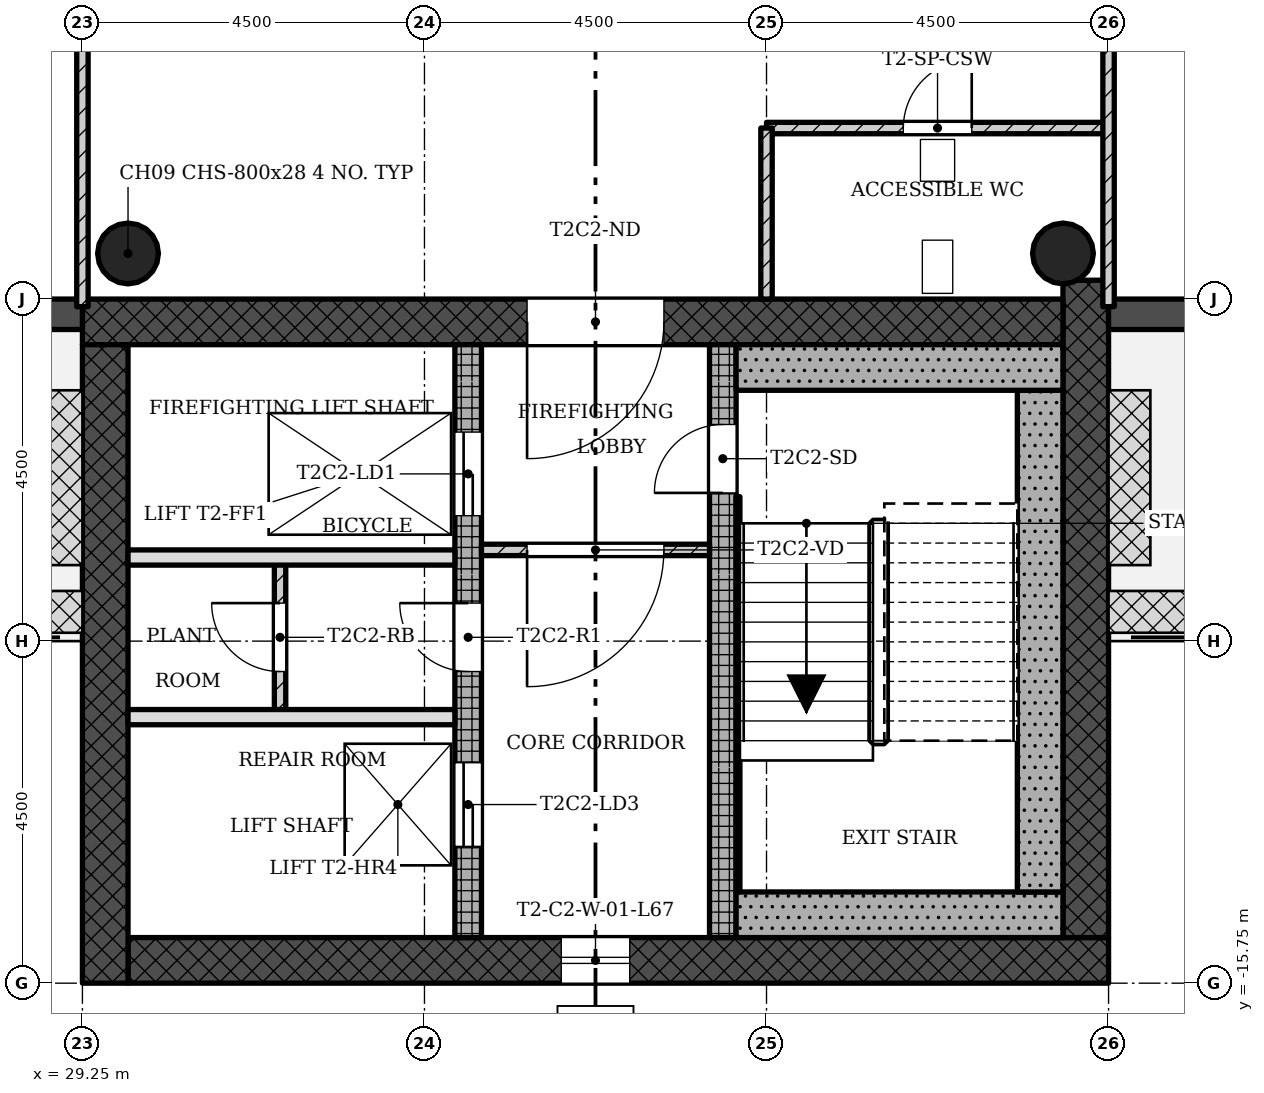
"""IFC4 building model, lengths in metres.
Left out: names, types, materials, properties, quantities, classifications, styles, units other than length and angle.
Written with IfcOpenShell. Run it as: python <this file> out.ifc"""

import sys

from ifc_helpers import new_model, si_unit, direction, frame, frame_2d, origin, origin_2d, place, context, subcontext, project, spatial, rectangle, hollow_circle, extrude, element, fill, save


model = new_model("IFC4")
c1 = context("Model", 3, precision=1e-05, world=origin(), true_north=direction((0.0, 1.0)))
c2 = subcontext(c1, "Body", "Model", "MODEL_VIEW")
j1 = project(units=[si_unit("LENGTHUNIT", "METRE"), si_unit("PLANEANGLEUNIT", "RADIAN")], contexts=[c1])
p1 = place(None, origin())
s1 = spatial("IfcSite", under=j1, at=p1, CompositionType="ELEMENT")
p2 = place(p1, origin())
s2 = spatial("IfcBuilding", under=s1, at=p2, CompositionType="ELEMENT")
p3 = place(p2, frame((0.0, 0.0, 242.4)))
s3 = spatial("IfcBuildingStorey", under=s2, at=p3, CompositionType="ELEMENT", Elevation=242.4)
p4 = place(p3, frame((29.85, -15.45, 0.0), z_axis=(0.0, 0.0, 1.0), x_axis=(1.0, 0.0, 0.0)))
e1 = element("IfcWall", 1, at=p4, inside=s3, PredefinedType="SHEAR", context=c2, shape_type="SweptSolid", body=[
    extrude(rectangle(XDim=12.9, YDim=0.6, at=frame_2d((6.45, 0.0))), origin(), (0.0, 0.0, 1.0), 4.5),
])
p5 = place(p4, frame((5.7, 0.0, 0.45)))
e2 = element("IfcOpeningElement", 2, at=p5, cuts=e1, PredefinedType="OPENING", context=c2, shape_type="SweptSolid", body=[
    extrude(rectangle(XDim=0.9, YDim=2.4, at=frame_2d((0.45, 1.2))), frame((0.0, 0.31, 0.0), z_axis=(0.0, -1.0, 0.0), x_axis=(1.0, 0.0, 0.0)), (0.0, 0.0, 1.0), 0.62),
])
p6 = place(p3, frame((42.45, -15.15, 0.0), z_axis=(0.0, 0.0, 1.0), x_axis=(0.0, 1.0, 0.0)))
e3 = element("IfcWall", 3, at=p6, inside=s3, PredefinedType="SHEAR", context=c2, shape_type="SweptSolid", body=[
    extrude(rectangle(XDim=8.648, YDim=0.6, at=frame_2d((4.324, 0.0))), origin(), (0.0, 0.0, 1.0), 4.5),
])
p7 = place(p3, frame((42.15, -7.05, 0.0), z_axis=(0.0, 0.0, 1.0), x_axis=(-1.0, 0.0, 0.0)))
e4 = element("IfcWall", 4, at=p7, inside=s3, PredefinedType="SHEAR", context=c2, shape_type="SweptSolid", body=[
    extrude(rectangle(XDim=12.9, YDim=0.6, at=frame_2d((6.45, 0.0))), origin(), (0.0, 0.0, 1.0), 4.5),
])
p8 = place(p7, frame((5.25, 0.0, 0.0)))
e5 = element("IfcOpeningElement", 5, at=p8, cuts=e4, PredefinedType="OPENING", context=c2, shape_type="SweptSolid", body=[
    extrude(rectangle(XDim=1.8, YDim=2.1, at=frame_2d((0.9, 1.05))), frame((0.0, 0.31, 0.0), z_axis=(0.0, -1.0, 0.0), x_axis=(1.0, 0.0, 0.0)), (0.0, 0.0, 1.0), 0.62),
])
p9 = place(p3, frame((29.55, -7.35, 0.0), z_axis=(0.0, 0.0, 1.0), x_axis=(0.0, -1.0, 0.0)))
e6 = element("IfcWall", 6, at=p9, inside=s3, PredefinedType="SHEAR", context=c2, shape_type="SweptSolid", body=[
    extrude(rectangle(XDim=8.4, YDim=0.6, at=frame_2d((4.2, 0.0))), origin(), (0.0, 0.0, 1.0), 4.5),
])
p10 = place(p3, frame((34.325, -15.15, 0.0), z_axis=(0.0, 0.0, 1.0), x_axis=(0.0, 1.0, 0.0)))
e7 = element("IfcWall", 7, at=p10, inside=s3, PredefinedType="SHEAR", context=c2, shape_type="SweptSolid", body=[
    extrude(rectangle(XDim=7.8, YDim=0.35, at=frame_2d((3.9, 0.0))), origin(), (0.0, 0.0, 1.0), 4.5),
])
p11 = place(p10, frame((5.55, 0.0, 0.0)))
e8 = element("IfcOpeningElement", 8, at=p11, cuts=e7, PredefinedType="OPENING", context=c2, shape_type="SweptSolid", body=[
    extrude(rectangle(XDim=1.1, YDim=2.1, at=frame_2d((0.55, 1.05))), frame((0.0, 0.185, 0.0), z_axis=(0.0, -1.0, 0.0), x_axis=(1.0, 0.0, 0.0)), (0.0, 0.0, 1.0), 0.37),
])
p12 = place(p10, frame((1.2, 0.0, 0.0)))
e9 = element("IfcOpeningElement", 9, at=p12, cuts=e7, PredefinedType="OPENING", context=c2, shape_type="SweptSolid", body=[
    extrude(rectangle(XDim=1.1, YDim=2.1, at=frame_2d((0.55, 1.05))), frame((0.0, 0.185, 0.0), z_axis=(0.0, -1.0, 0.0), x_axis=(1.0, 0.0, 0.0)), (0.0, 0.0, 1.0), 0.37),
])
p13 = place(p10, frame((3.5, 0.0, 0.0)))
e10 = element("IfcOpeningElement", 10, at=p13, cuts=e7, PredefinedType="OPENING", context=c2, shape_type="SweptSolid", body=[
    extrude(rectangle(XDim=0.9, YDim=2.1, at=frame_2d((0.45, 1.05))), frame((0.0, 0.185, 0.0), z_axis=(0.0, -1.0, 0.0), x_axis=(1.0, 0.0, 0.0)), (0.0, 0.0, 1.0), 0.37),
])
p14 = place(p3, frame((37.675, -15.15, 0.0), z_axis=(0.0, 0.0, 1.0), x_axis=(0.0, 1.0, 0.0)))
e11 = element("IfcWall", 11, at=p14, inside=s3, PredefinedType="SHEAR", context=c2, shape_type="SweptSolid", body=[
    extrude(rectangle(XDim=7.8, YDim=0.35, at=frame_2d((3.9, 0.0))), origin(), (0.0, 0.0, 1.0), 4.5),
])
p15 = place(p14, frame((5.85, 0.0, 0.0)))
e12 = element("IfcOpeningElement", 12, at=p15, cuts=e11, PredefinedType="OPENING", context=c2, shape_type="SweptSolid", body=[
    extrude(rectangle(XDim=0.9, YDim=2.1, at=frame_2d((0.45, 1.05))), frame((0.0, 0.185, 0.0), z_axis=(0.0, -1.0, 0.0), x_axis=(1.0, 0.0, 0.0)), (0.0, 0.0, 1.0), 0.37),
])
for number, where, z_axis, x_axis in (
    (13, (42.15, -6.15, 0.0), (0.0, 0.0, 1.0), (1.0, 0.0, 0.0)),
    (14, (29.85, -6.15, 0.0), (0.0, 0.0, 1.0), (1.0, 0.0, 0.0)),
):
    element("IfcColumn", number, at=place(p3, frame(where, z_axis=z_axis, x_axis=x_axis)), inside=s3, PredefinedType="COLUMN", context=c2, shape_type="SweptSolid", body=[
        extrude(hollow_circle(Radius=0.4, WallThickness=0.028, at=origin_2d()), origin(), (0.0, 0.0, 1.0), 4.5),
    ])
p16 = place(p3, frame((42.75, -6.95, -0.02), z_axis=(0.0, 0.0, 1.0), x_axis=(1.0, 0.0, 0.0)))
e15 = element("IfcWall", 15, at=p16, inside=s3, PredefinedType="STANDARD", context=c2, shape_type="SweptSolid", body=[
    extrude(rectangle(XDim=4.5, YDim=0.4, at=frame_2d((2.25, 0.0))), origin(), (0.0, 0.0, 1.0), 4.22),
])
p17 = place(p16, frame((1.35, 0.0, 0.02)))
e16 = element("IfcOpeningElement", 16, at=p17, cuts=e15, PredefinedType="OPENING", context=c2, shape_type="SweptSolid", body=[
    extrude(rectangle(XDim=1.8, YDim=2.1, at=frame_2d((0.9, 1.05))), frame((0.0, 0.21, 0.0), z_axis=(0.0, -1.0, 0.0), x_axis=(1.0, 0.0, 0.0)), (0.0, 0.0, 1.0), 0.42),
])
p18 = place(p3, frame((24.75, -6.95, -0.02), z_axis=(0.0, 0.0, 1.0), x_axis=(1.0, 0.0, 0.0)))
e17 = element("IfcWall", 17, at=p18, inside=s3, PredefinedType="STANDARD", context=c2, shape_type="SweptSolid", body=[
    extrude(rectangle(XDim=4.5, YDim=0.4, at=frame_2d((2.25, 0.0))), origin(), (0.0, 0.0, 1.0), 4.22),
])
p19 = place(p18, frame((1.35, 0.0, 0.02)))
e18 = element("IfcOpeningElement", 18, at=p19, cuts=e17, PredefinedType="OPENING", context=c2, shape_type="SweptSolid", body=[
    extrude(rectangle(XDim=1.8, YDim=2.1, at=frame_2d((0.9, 1.05))), frame((0.0, 0.21, 0.0), z_axis=(0.0, -1.0, 0.0), x_axis=(1.0, 0.0, 0.0)), (0.0, 0.0, 1.0), 0.42),
])
p20 = place(p3, frame((34.5, -10.05, 0.0), z_axis=(0.0, 0.0, 1.0), x_axis=(1.0, 0.0, 0.0)))
e19 = element("IfcWall", 19, at=p20, inside=s3, PredefinedType="PARTITIONING", context=c2, shape_type="SweptSolid", body=[
    extrude(rectangle(XDim=3.0, YDim=0.15, at=frame_2d((1.5, 0.0))), origin(), (0.0, 0.0, 1.0), 4.08),
])
p21 = place(p20, frame((0.6, 0.0, 0.0)))
e20 = element("IfcOpeningElement", 20, at=p21, cuts=e19, PredefinedType="OPENING", context=c2, shape_type="SweptSolid", body=[
    extrude(rectangle(XDim=1.8, YDim=2.1, at=frame_2d((0.9, 1.05))), frame((0.0, 0.085, 0.0), z_axis=(0.0, -1.0, 0.0), x_axis=(1.0, 0.0, 0.0)), (0.0, 0.0, 1.0), 0.17),
])
for number, where, z_axis, x_axis in (
    (21, (29.85, -12.25, 0.0), (0.0, 0.0, 1.0), (1.0, 0.0, 0.0)),
    (22, (29.85, -10.15, 0.0), (0.0, 0.0, 1.0), (1.0, 0.0, 0.0)),
):
    element("IfcWall", number, at=place(p3, frame(where, z_axis=z_axis, x_axis=x_axis)), inside=s3, PredefinedType="SOLIDWALL", context=c2, shape_type="SweptSolid", body=[
        extrude(rectangle(XDim=4.3, YDim=0.2, at=frame_2d((2.15, 0.0))), origin(), (0.0, 0.0, 1.0), 4.08),
    ])
p22 = place(p3, frame((31.85, -10.15, 0.0), z_axis=(0.0, 0.0, 1.0), x_axis=(0.0, -1.0, 0.0)))
e23 = element("IfcWall", 23, at=p22, inside=s3, PredefinedType="PARTITIONING", context=c2, shape_type="SweptSolid", body=[
    extrude(rectangle(XDim=2.1, YDim=0.15, at=frame_2d((1.05, 0.0))), origin(), (0.0, 0.0, 1.0), 4.08),
])
p23 = place(p22, frame((0.6, 0.0, 0.0)))
e24 = element("IfcOpeningElement", 24, at=p23, cuts=e23, PredefinedType="OPENING", context=c2, shape_type="SweptSolid", body=[
    extrude(rectangle(XDim=0.9, YDim=2.1, at=frame_2d((0.45, 1.05))), frame((0.0, 0.085, 0.0), z_axis=(0.0, -1.0, 0.0), x_axis=(1.0, 0.0, 0.0)), (0.0, 0.0, 1.0), 0.17),
])
p24 = place(p3, frame((42.75, -4.5, 0.0), z_axis=(0.0, 0.0, 1.0), x_axis=(-1.0, 0.0, 0.0)))
e25 = element("IfcWall", 25, at=p24, inside=s3, PredefinedType="PARTITIONING", context=c2, shape_type="SweptSolid", body=[
    extrude(rectangle(XDim=4.5, YDim=0.15, at=frame_2d((2.25, 0.0))), origin(), (0.0, 0.0, 1.0), 4.08),
])
p25 = place(p24, frame((1.8, 0.0, 0.0)))
e26 = element("IfcOpeningElement", 26, at=p25, cuts=e25, PredefinedType="OPENING", context=c2, shape_type="SweptSolid", body=[
    extrude(rectangle(XDim=0.9, YDim=2.1, at=frame_2d((0.45, 1.05))), frame((0.0, 0.085, 0.0), z_axis=(0.0, -1.0, 0.0), x_axis=(1.0, 0.0, 0.0)), (0.0, 0.0, 1.0), 0.17),
])
p26 = place(p3, frame((38.25, -6.75, 0.0), z_axis=(0.0, 0.0, 1.0), x_axis=(0.0, 1.0, 0.0)))
e27 = element("IfcWall", 27, at=p26, inside=s3, PredefinedType="PARTITIONING", context=c2, shape_type="SweptSolid", body=[
    extrude(rectangle(XDim=2.25, YDim=0.15, at=frame_2d((1.125, 0.0))), origin(), (0.0, 0.0, 1.0), 4.08),
])
p27 = place(p3, frame((29.25, -6.85, 0.0), z_axis=(0.0, 0.0, 1.0), x_axis=(0.0, 1.0, 0.0)))
e28 = element("IfcWall", 28, at=p27, inside=s3, PredefinedType="PARTITIONING", context=c2, shape_type="SweptSolid", body=[
    extrude(rectangle(XDim=13.7, YDim=0.15, at=frame_2d((6.85, 0.0))), origin(), (0.0, 0.0, 1.0), 4.08),
])
p28 = place(p27, frame((5.95, 0.0, 0.0)))
e29 = element("IfcOpeningElement", 29, at=p28, cuts=e28, PredefinedType="OPENING", context=c2, shape_type="SweptSolid", body=[
    extrude(rectangle(XDim=1.8, YDim=2.1, at=frame_2d((0.9, 1.05))), frame((0.0, 0.085, 0.0), z_axis=(0.0, -1.0, 0.0), x_axis=(1.0, 0.0, 0.0)), (0.0, 0.0, 1.0), 0.17),
])
p29 = place(p3, frame((42.75, -6.85, 0.0), z_axis=(0.0, 0.0, 1.0), x_axis=(0.0, 1.0, 0.0)))
e30 = element("IfcWall", 30, at=p29, inside=s3, PredefinedType="PARTITIONING", context=c2, shape_type="SweptSolid", body=[
    extrude(rectangle(XDim=13.7, YDim=0.15, at=frame_2d((6.85, 0.0))), origin(), (0.0, 0.0, 1.0), 4.08),
])
p30 = place(p29, frame((5.95, 0.0, 0.0)))
e31 = element("IfcOpeningElement", 31, at=p30, cuts=e30, PredefinedType="OPENING", context=c2, shape_type="SweptSolid", body=[
    extrude(rectangle(XDim=1.8, YDim=2.1, at=frame_2d((0.9, 1.05))), frame((0.0, 0.085, 0.0), z_axis=(0.0, -1.0, 0.0), x_axis=(1.0, 0.0, 0.0)), (0.0, 0.0, 1.0), 0.17),
])
p31 = place(p3, frame((37.85, -14.85, 0.0), z_axis=(0.0, 0.0, 1.0), x_axis=(1.0, 0.0, 0.0)))
e32 = element("IfcWall", 32, at=p31, inside=s3, PredefinedType="SHEAR", context=c2, shape_type="SweptSolid", body=[
    extrude(rectangle(XDim=4.3, YDim=0.6, at=frame_2d((2.15, 0.0))), origin(), (0.0, 0.0, 1.0), 4.5),
])
p32 = place(p3, frame((41.85, -7.95, 0.0), z_axis=(0.0, 0.0, 1.0), x_axis=(0.0, -1.0, 0.0)))
e33 = element("IfcWall", 33, at=p32, inside=s3, PredefinedType="SHEAR", context=c2, shape_type="SweptSolid", body=[
    extrude(rectangle(XDim=6.6, YDim=0.6, at=frame_2d((3.3, 0.0))), origin(), (0.0, 0.0, 1.0), 4.5),
])
p33 = place(p3, frame((37.85, -7.65, 0.0), z_axis=(0.0, 0.0, 1.0), x_axis=(1.0, 0.0, 0.0)))
e34 = element("IfcWall", 34, at=p33, inside=s3, PredefinedType="SHEAR", context=c2, shape_type="SweptSolid", body=[
    extrude(rectangle(XDim=4.3, YDim=0.6, at=frame_2d((2.15, 0.0))), origin(), (0.0, 0.0, 1.0), 4.5),
])
p34 = place(p3, frame((37.875, -9.35, 0.0), z_axis=(0.0, 0.0, 1.0), x_axis=(0.0, -1.0, 0.0)))
e35 = element("IfcWall", 35, at=p34, inside=s3, PredefinedType="SHEAR", context=c2, shape_type="SweptSolid", body=[
    extrude(rectangle(XDim=5.2, YDim=0.05, at=frame_2d((2.6, 0.0))), origin(), (0.0, 0.0, 1.0), 4.5),
])
p35 = place(p5, origin())
e36 = element("IfcWindow", 36, at=p35, inside=s3, PartitioningType="SINGLE_PANEL", PredefinedType="WINDOW", context=c2, shape_type="SweptSolid", body=[
    extrude(rectangle(XDim=0.9, YDim=2.4, at=frame_2d((0.45, 1.2))), frame((0.0, 0.03, 0.0), z_axis=(0.0, -1.0, 0.0), x_axis=(1.0, 0.0, 0.0)), (0.0, 0.0, 1.0), 0.06),
])
fill(e2, e36)
p36 = place(p21, origin())
e37 = element("IfcDoor", 37, at=p36, inside=s3, OperationType="SINGLE_SWING_LEFT", PredefinedType="DOOR", context=c2, shape_type="SweptSolid", body=[
    extrude(rectangle(XDim=1.8, YDim=2.1, at=frame_2d((0.9, 1.05))), frame((0.0, 0.025, 0.0), z_axis=(0.0, -1.0, 0.0), x_axis=(1.0, 0.0, 0.0)), (0.0, 0.0, 1.0), 0.05),
])
fill(e20, e37)
p37 = place(p23, origin())
e38 = element("IfcDoor", 38, at=p37, inside=s3, OperationType="SINGLE_SWING_LEFT", PredefinedType="DOOR", context=c2, shape_type="SweptSolid", body=[
    extrude(rectangle(XDim=0.9, YDim=2.1, at=frame_2d((0.45, 1.05))), frame((0.0, 0.025, 0.0), z_axis=(0.0, -1.0, 0.0), x_axis=(1.0, 0.0, 0.0)), (0.0, 0.0, 1.0), 0.05),
])
fill(e24, e38)
p38 = place(p25, origin())
e39 = element("IfcDoor", 39, at=p38, inside=s3, OperationType="SINGLE_SWING_LEFT", PredefinedType="DOOR", context=c2, shape_type="SweptSolid", body=[
    extrude(rectangle(XDim=0.9, YDim=2.1, at=frame_2d((0.45, 1.05))), frame((0.0, 0.025, 0.0), z_axis=(0.0, -1.0, 0.0), x_axis=(1.0, 0.0, 0.0)), (0.0, 0.0, 1.0), 0.05),
])
fill(e26, e39)
p39 = place(p15, origin())
e40 = element("IfcDoor", 40, at=p39, inside=s3, OperationType="SINGLE_SWING_RIGHT", PredefinedType="DOOR", context=c2, shape_type="SweptSolid", body=[
    extrude(rectangle(XDim=0.9, YDim=2.1, at=frame_2d((0.45, 1.05))), frame((0.0, 0.025, 0.0), z_axis=(0.0, -1.0, 0.0), x_axis=(1.0, 0.0, 0.0)), (0.0, 0.0, 1.0), 0.05),
])
fill(e12, e40)
p40 = place(p11, origin())
e41 = element("IfcDoor", 41, at=p40, inside=s3, OperationType="SLIDING_TO_LEFT", PredefinedType="DOOR", context=c2, shape_type="SweptSolid", body=[
    extrude(rectangle(XDim=1.1, YDim=2.1, at=frame_2d((0.55, 1.05))), frame((0.0, 0.025, 0.0), z_axis=(0.0, -1.0, 0.0), x_axis=(1.0, 0.0, 0.0)), (0.0, 0.0, 1.0), 0.05),
])
fill(e8, e41)
p41 = place(p12, origin())
e42 = element("IfcDoor", 42, at=p41, inside=s3, OperationType="SLIDING_TO_LEFT", PredefinedType="DOOR", context=c2, shape_type="SweptSolid", body=[
    extrude(rectangle(XDim=1.1, YDim=2.1, at=frame_2d((0.55, 1.05))), frame((0.0, 0.025, 0.0), z_axis=(0.0, -1.0, 0.0), x_axis=(1.0, 0.0, 0.0)), (0.0, 0.0, 1.0), 0.05),
])
fill(e9, e42)
p42 = place(p13, origin())
e43 = element("IfcDoor", 43, at=p42, inside=s3, OperationType="SINGLE_SWING_LEFT", PredefinedType="DOOR", context=c2, shape_type="SweptSolid", body=[
    extrude(rectangle(XDim=0.9, YDim=2.1, at=frame_2d((0.45, 1.05))), frame((0.0, 0.025, 0.0), z_axis=(0.0, -1.0, 0.0), x_axis=(1.0, 0.0, 0.0)), (0.0, 0.0, 1.0), 0.05),
])
fill(e10, e43)
p43 = place(p8, origin())
e44 = element("IfcDoor", 44, at=p43, inside=s3, OperationType="SINGLE_SWING_LEFT", PredefinedType="DOOR", context=c2, shape_type="SweptSolid", body=[
    extrude(rectangle(XDim=1.8, YDim=2.1, at=frame_2d((0.9, 1.05))), frame((0.0, 0.025, 0.0), z_axis=(0.0, -1.0, 0.0), x_axis=(1.0, 0.0, 0.0)), (0.0, 0.0, 1.0), 0.05),
])
fill(e5, e44)
save(model, sys.argv[1])
